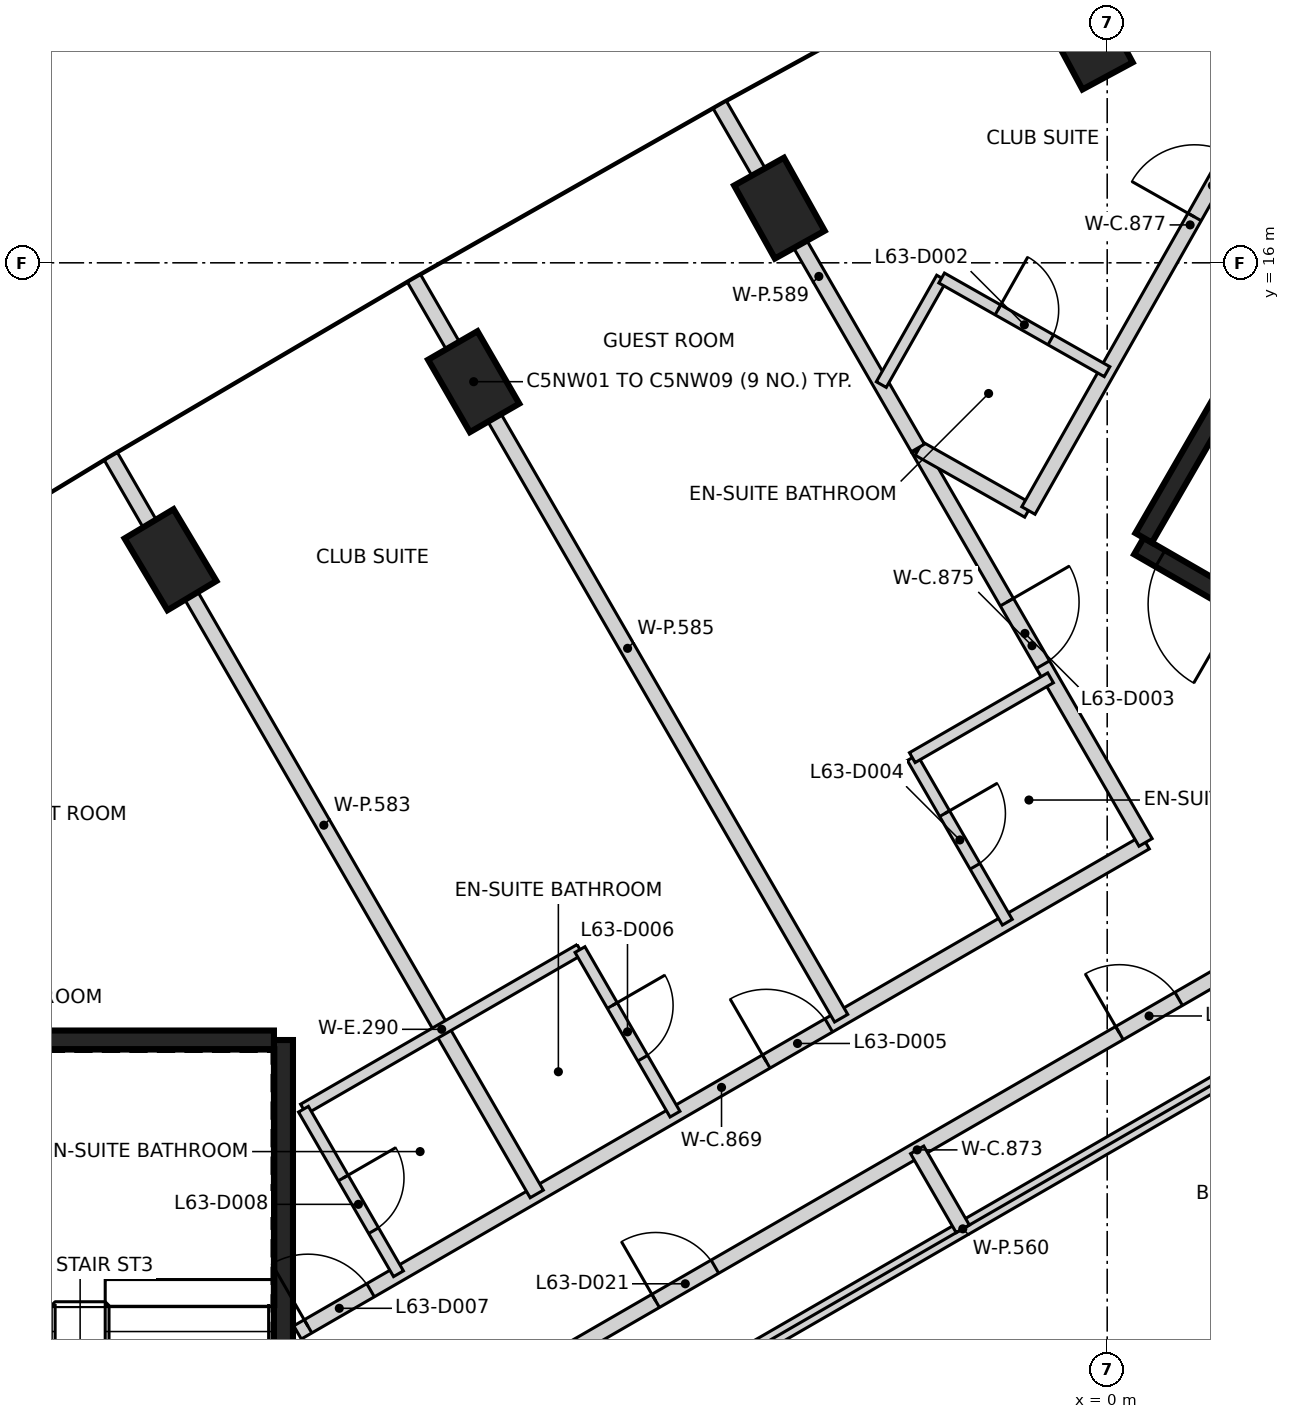
"""IFC4 building model, lengths in metres.
Left out: names, types, materials, properties, quantities, classifications, styles, units other than length and angle.
Written with IfcOpenShell. Run it as: python <this file> out.ifc"""

import sys

from ifc_helpers import new_model, si_unit, direction, frame, frame_2d, origin, origin_2d, place, context, subcontext, project, spatial, rectangle, extrude, element, fill, save


model = new_model("IFC4")
c1 = context("Model", 3, precision=1e-05, world=origin(), true_north=direction((0.0, 1.0)))
c2 = subcontext(c1, "Body", "Model", "MODEL_VIEW")
j1 = project(units=[si_unit("LENGTHUNIT", "METRE"), si_unit("PLANEANGLEUNIT", "RADIAN")], contexts=[c1])
p1 = place(None, origin())
s1 = spatial("IfcSite", under=j1, at=p1, CompositionType="ELEMENT")
p2 = place(p1, origin())
s2 = spatial("IfcBuilding", under=s1, at=p2, CompositionType="ELEMENT")
p3 = place(p2, frame((0.0, 0.0, 250.2)))
s3 = spatial("IfcBuildingStorey", under=s2, at=p3, CompositionType="ELEMENT", Elevation=250.2)
for number, where, z_axis, x_axis in (
    (1, (-0.256, 18.943, -0.35), (0.0, 0.0, 1.0), (-0.475, 0.88, 0.0)),
    (2, (-4.312, 16.719, -0.35), (0.0, 0.0, 1.0), (-0.487, 0.873, 0.0)),
    (3, (-8.335, 14.436, -0.35), (0.0, 0.0, 1.0), (-0.5, 0.866, 0.0)),
    (4, (-12.323, 12.094, -0.35), (0.0, 0.0, 1.0), (-0.513, 0.858, 0.0)),
):
    element("IfcColumn", number, at=place(p3, frame(where, z_axis=z_axis, x_axis=x_axis)), inside=s3, PredefinedType="COLUMN", context=c2, shape_type="SweptSolid", body=[
        extrude(rectangle(XDim=1.1, YDim=0.75, at=origin_2d()), origin(), (0.0, 0.0, 1.0), 3.6),
    ])
p4 = place(p3, frame((-10.837, 5.775, 0.0), z_axis=(0.0, 0.0, 1.0), x_axis=(0.0, -1.0, 0.0)))
e5 = element("IfcWall", 5, at=p4, inside=s3, PredefinedType="SHEAR", context=c2, shape_type="SweptSolid", body=[
    extrude(rectangle(XDim=11.55, YDim=0.25, at=frame_2d((5.775, 0.0))), origin(), (0.0, 0.0, 1.0), 3.25),
])
p5 = place(p4, frame((10.025, 0.0, 0.0)))
e6 = element("IfcOpeningElement", 6, at=p5, cuts=e5, PredefinedType="OPENING", context=c2, shape_type="SweptSolid", body=[
    extrude(rectangle(XDim=1.2, YDim=2.1, at=frame_2d((0.6, 1.05))), frame((0.0, 0.135, 0.0), z_axis=(0.0, -1.0, 0.0), x_axis=(1.0, 0.0, 0.0)), (0.0, 0.0, 1.0), 0.27),
])
p6 = place(p4, frame((8.725, 0.0, 0.0)))
e7 = element("IfcOpeningElement", 7, at=p6, cuts=e5, PredefinedType="OPENING", context=c2, shape_type="SweptSolid", body=[
    extrude(rectangle(XDim=1.2, YDim=2.1, at=frame_2d((0.6, 1.05))), frame((0.0, 0.135, 0.0), z_axis=(0.0, -1.0, 0.0), x_axis=(1.0, 0.0, 0.0)), (0.0, 0.0, 1.0), 0.27),
])
p7 = place(p3, frame((-16.472, 5.775, 0.0), z_axis=(0.0, 0.0, 1.0), x_axis=(1.0, 0.0, 0.0)))
e8 = element("IfcWall", 8, at=p7, inside=s3, PredefinedType="SHEAR", context=c2, shape_type="SweptSolid", body=[
    extrude(rectangle(XDim=5.51, YDim=0.25, at=frame_2d((2.755, 0.0))), origin(), (0.0, 0.0, 1.0), 3.25),
])
p8 = place(p3, frame((10.42, 6.498, 0.0), z_axis=(0.0, 0.0, 1.0), x_axis=(-0.866021906294, 0.500006057782, 0.0)))
e9 = element("IfcWall", 9, at=p8, inside=s3, PredefinedType="SHEAR", context=c2, shape_type="SweptSolid", body=[
    extrude(rectangle(XDim=11.55, YDim=0.25, at=frame_2d((5.775, 0.0))), origin(), (0.0, 0.0, 1.0), 3.25),
])
p9 = place(p8, frame((10.025, 0.0, 0.0)))
e10 = element("IfcOpeningElement", 10, at=p9, cuts=e9, PredefinedType="OPENING", context=c2, shape_type="SweptSolid", body=[
    extrude(rectangle(XDim=1.2, YDim=2.1, at=frame_2d((0.6, 1.05))), frame((0.0, 0.135, 0.0), z_axis=(0.0, -1.0, 0.0), x_axis=(1.0, 0.0, 0.0)), (0.0, 0.0, 1.0), 0.27),
])
p10 = place(p8, frame((8.725, 0.0, 0.0)))
e11 = element("IfcOpeningElement", 11, at=p10, cuts=e9, PredefinedType="OPENING", context=c2, shape_type="SweptSolid", body=[
    extrude(rectangle(XDim=1.2, YDim=2.1, at=frame_2d((0.6, 1.05))), frame((0.0, 0.135, 0.0), z_axis=(0.0, -1.0, 0.0), x_axis=(1.0, 0.0, 0.0)), (0.0, 0.0, 1.0), 0.27),
])
p11 = place(p3, frame((0.48, 12.381, 0.0), z_axis=(0.0, 0.0, 1.0), x_axis=(0.49999885962, 0.866026062182, 0.0)))
e12 = element("IfcWall", 12, at=p11, inside=s3, PredefinedType="SHEAR", context=c2, shape_type="SweptSolid", body=[
    extrude(rectangle(XDim=5.225, YDim=0.25, at=frame_2d((2.612, 0.0))), origin(), (0.0, 0.0, 1.0), 3.25),
])
p12 = place(p3, frame((-10.652, 1.928, 0.0), z_axis=(0.0, 0.0, 1.0), x_axis=(0.865793573301, 0.500401327367, 0.0)))
e13 = element("IfcWall", 13, at=p12, inside=s3, PredefinedType="PARTITIONING", context=c2, shape_type="SweptSolid", body=[
    extrude(rectangle(XDim=12.886, YDim=0.2, at=frame_2d((6.443, 0.0))), origin(), (0.0, 0.0, 1.0), 3.25),
])
p13 = place(p12, frame((7.123, 0.0, 0.0)))
e14 = element("IfcOpeningElement", 14, at=p13, cuts=e13, PredefinedType="OPENING", context=c2, shape_type="SweptSolid", body=[
    extrude(rectangle(XDim=0.95, YDim=2.1, at=frame_2d((0.475, 1.05))), frame((0.0, 0.11, 0.0), z_axis=(0.0, -1.0, 0.0), x_axis=(1.0, 0.0, 0.0)), (0.0, 0.0, 1.0), 0.22),
])
p14 = place(p12, frame((0.16, 0.0, 0.0)))
e15 = element("IfcOpeningElement", 15, at=p14, cuts=e13, PredefinedType="OPENING", context=c2, shape_type="SweptSolid", body=[
    extrude(rectangle(XDim=0.95, YDim=2.1, at=frame_2d((0.475, 1.05))), frame((0.0, 0.11, 0.0), z_axis=(0.0, -1.0, 0.0), x_axis=(1.0, 0.0, 0.0)), (0.0, 0.0, 1.0), 0.22),
])
p15 = place(p3, frame((-8.612, 0.801, 0.0), z_axis=(0.0, 0.0, 1.0), x_axis=(0.866005560651, 0.500034367741, 0.0)))
e16 = element("IfcWall", 16, at=p15, inside=s3, PredefinedType="PARTITIONING", context=c2, shape_type="SweptSolid", body=[
    extrude(rectangle(XDim=14.115, YDim=0.2, at=frame_2d((7.058, 0.0))), origin(), (0.0, 0.0, 1.0), 3.25),
])
p16 = place(p15, frame((10.131, 0.0, 0.0)))
e17 = element("IfcOpeningElement", 17, at=p16, cuts=e16, PredefinedType="OPENING", context=c2, shape_type="SweptSolid", body=[
    extrude(rectangle(XDim=0.9, YDim=2.1, at=frame_2d((0.45, 1.05))), frame((0.0, 0.11, 0.0), z_axis=(0.0, -1.0, 0.0), x_axis=(1.0, 0.0, 0.0)), (0.0, 0.0, 1.0), 0.22),
])
p17 = place(p15, frame((3.085, 0.0, 0.0)))
e18 = element("IfcOpeningElement", 18, at=p17, cuts=e16, PredefinedType="OPENING", context=c2, shape_type="SweptSolid", body=[
    extrude(rectangle(XDim=0.9, YDim=2.1, at=frame_2d((0.45, 1.05))), frame((0.0, 0.11, 0.0), z_axis=(0.0, -1.0, 0.0), x_axis=(1.0, 0.0, 0.0)), (0.0, 0.0, 1.0), 0.22),
])
p18 = place(p3, frame((-2.483, 13.551, 0.0), z_axis=(0.0, 0.0, 1.0), x_axis=(0.499878046143, -0.866095802429, 0.0)))
e19 = element("IfcWall", 19, at=p18, inside=s3, PredefinedType="PARTITIONING", context=c2, shape_type="SweptSolid", body=[
    extrude(rectangle(XDim=5.977, YDim=0.2, at=frame_2d((2.988, 0.0))), origin(), (0.0, 0.0, 1.0), 3.25),
])
p19 = place(p18, frame((2.327, 0.0, 0.0)))
e20 = element("IfcOpeningElement", 20, at=p19, cuts=e19, PredefinedType="OPENING", context=c2, shape_type="SweptSolid", body=[
    extrude(rectangle(XDim=0.95, YDim=2.1, at=frame_2d((0.475, 1.05))), frame((0.0, 0.11, 0.0), z_axis=(0.0, -1.0, 0.0), x_axis=(1.0, 0.0, 0.0)), (0.0, 0.0, 1.0), 0.22),
])
p20 = place(p3, frame((-2.478, 13.556, 0.0), z_axis=(0.0, 0.0, 1.0), x_axis=(0.870609500021, -0.491974692919, 0.0)))
e21 = element("IfcWall", 21, at=p20, inside=s3, PredefinedType="PARTITIONING", context=c2, shape_type="SweptSolid", body=[
    extrude(rectangle(XDim=1.656, YDim=0.2, at=frame_2d((0.828, 0.0))), origin(), (0.0, 0.0, 1.0), 3.25),
])
p21 = place(p3, frame((-1.037, 12.741, 0.0), z_axis=(0.0, 0.0, 1.0), x_axis=(0.492679417867, 0.870210888929, 0.0)))
e22 = element("IfcWall", 22, at=p21, inside=s3, PredefinedType="PARTITIONING", context=c2, shape_type="SweptSolid", body=[
    extrude(rectangle(XDim=8.636, YDim=0.2, at=frame_2d((4.318, 0.0))), origin(), (0.0, 0.0, 1.0), 3.25),
])
p22 = place(p21, frame((4.438, 0.0, 0.0)))
e23 = element("IfcOpeningElement", 23, at=p22, cuts=e22, PredefinedType="OPENING", context=c2, shape_type="SweptSolid", body=[
    extrude(rectangle(XDim=0.95, YDim=2.1, at=frame_2d((0.475, 1.05))), frame((0.0, 0.11, 0.0), z_axis=(0.0, -1.0, 0.0), x_axis=(1.0, 0.0, 0.0)), (0.0, 0.0, 1.0), 0.22),
])
p23 = place(p3, frame((-13.107, 13.453, 0.0), z_axis=(0.0, 0.0, 1.0), x_axis=(0.50003870279, -0.866003057565, 0.0)))
e24 = element("IfcWall", 24, at=p23, inside=s3, PredefinedType="PARTITIONING", context=c2, shape_type="SweptSolid", body=[
    extrude(rectangle(XDim=11.204, YDim=0.2, at=frame_2d((5.602, 0.0))), origin(), (0.0, 0.0, 1.0), 3.25),
])
p24 = place(p3, frame((-9.119, 15.795, 0.0), z_axis=(0.0, 0.0, 1.0), x_axis=(0.500015176972, -0.866016641178, 0.0)))
e25 = element("IfcWall", 25, at=p24, inside=s3, PredefinedType="PARTITIONING", context=c2, shape_type="SweptSolid", body=[
    extrude(rectangle(XDim=11.239, YDim=0.2, at=frame_2d((5.619, 0.0))), origin(), (0.0, 0.0, 1.0), 3.25),
])
p25 = place(p3, frame((-6.0, 0.924, 0.0), z_axis=(0.0, 0.0, 1.0), x_axis=(0.866012967051, 0.500021540435, 0.0)))
e26 = element("IfcWall", 26, at=p25, inside=s3, PredefinedType="PARTITIONING", context=c2, shape_type="SweptSolid", body=[
    extrude(rectangle(XDim=9.468, YDim=0.2, at=frame_2d((4.734, 0.0))), origin(), (0.0, 0.0, 1.0), 3.25),
])
p26 = place(p3, frame((-5.097, 18.078, 0.0), z_axis=(0.0, 0.0, 1.0), x_axis=(0.499977898262, -0.866038163853, 0.0)))
e27 = element("IfcWall", 27, at=p26, inside=s3, PredefinedType="PARTITIONING", context=c2, shape_type="SweptSolid", body=[
    extrude(rectangle(XDim=5.212, YDim=0.2, at=frame_2d((2.606, 0.0))), origin(), (0.0, 0.0, 1.0), 3.25),
])
p27 = place(p3, frame((-2.5, 4.33, 0.0), z_axis=(0.0, 0.0, 1.0), x_axis=(0.499969057507, -0.866043267704, 0.0)))
e28 = element("IfcWall", 28, at=p27, inside=s3, PredefinedType="PARTITIONING", context=c2, shape_type="SweptSolid", body=[
    extrude(rectangle(XDim=1.2, YDim=0.2, at=frame_2d((0.6, 0.0))), origin(), (0.0, 0.0, 1.0), 3.25),
])
p28 = place(p3, frame((-10.574, 4.866, 0.0), z_axis=(0.0, 0.0, 1.0), x_axis=(0.866052994476, 0.499952208475, 0.0)))
e29 = element("IfcWall", 29, at=p28, inside=s3, PredefinedType="PARTITIONING", context=c2, shape_type="SweptSolid", body=[
    extrude(rectangle(XDim=4.201, YDim=0.15, at=frame_2d((2.1, 0.0))), origin(), (0.0, 0.0, 1.0), 3.25),
])
p29 = place(p3, frame((-10.574, 4.865, 0.0), z_axis=(0.0, 0.0, 1.0), x_axis=(0.500004234368, -0.866022959057, 0.0)))
e30 = element("IfcWall", 30, at=p29, inside=s3, PredefinedType="PARTITIONING", context=c2, shape_type="SweptSolid", body=[
    extrude(rectangle(XDim=2.5, YDim=0.15, at=frame_2d((1.25, 0.0))), origin(), (0.0, 0.0, 1.0), 3.25),
])
p30 = place(p29, frame((1.045, 0.0, 0.0)))
e31 = element("IfcOpeningElement", 31, at=p30, cuts=e30, PredefinedType="OPENING", context=c2, shape_type="SweptSolid", body=[
    extrude(rectangle(XDim=0.8, YDim=2.1, at=frame_2d((0.4, 1.05))), frame((0.0, 0.085, 0.0), z_axis=(0.0, -1.0, 0.0), x_axis=(1.0, 0.0, 0.0)), (0.0, 0.0, 1.0), 0.17),
])
p31 = place(p3, frame((-6.936, 6.965, 0.0), z_axis=(0.0, 0.0, 1.0), x_axis=(0.500004234368, -0.866022959057, 0.0)))
e32 = element("IfcWall", 32, at=p31, inside=s3, PredefinedType="PARTITIONING", context=c2, shape_type="SweptSolid", body=[
    extrude(rectangle(XDim=2.5, YDim=0.15, at=frame_2d((1.25, 0.0))), origin(), (0.0, 0.0, 1.0), 3.25),
])
p32 = place(p31, frame((0.85, 0.0, 0.0)))
e33 = element("IfcOpeningElement", 33, at=p32, cuts=e32, PredefinedType="OPENING", context=c2, shape_type="SweptSolid", body=[
    extrude(rectangle(XDim=0.8, YDim=2.1, at=frame_2d((0.4, 1.05))), frame((0.0, 0.085, 0.0), z_axis=(0.0, -1.0, 0.0), x_axis=(1.0, 0.0, 0.0)), (0.0, 0.0, 1.0), 0.17),
])
p33 = place(p3, frame((-2.972, 14.398, 0.0), z_axis=(0.0, 0.0, 1.0), x_axis=(0.492741112884, 0.870175956732, 0.0)))
e34 = element("IfcWall", 34, at=p33, inside=s3, PredefinedType="PARTITIONING", context=c2, shape_type="SweptSolid", body=[
    extrude(rectangle(XDim=1.611, YDim=0.15, at=frame_2d((0.806, 0.0))), origin(), (0.0, 0.0, 1.0), 3.25),
])
p34 = place(p3, frame((-2.564, 9.49, 0.0), z_axis=(0.0, 0.0, 1.0), x_axis=(0.500004234368, -0.866022959057, 0.0)))
e35 = element("IfcWall", 35, at=p34, inside=s3, PredefinedType="PARTITIONING", context=c2, shape_type="SweptSolid", body=[
    extrude(rectangle(XDim=2.5, YDim=0.15, at=frame_2d((1.25, 0.0))), origin(), (0.0, 0.0, 1.0), 3.25),
])
p35 = place(p34, frame((0.85, 0.0, 0.0)))
e36 = element("IfcOpeningElement", 36, at=p35, cuts=e35, PredefinedType="OPENING", context=c2, shape_type="SweptSolid", body=[
    extrude(rectangle(XDim=0.8, YDim=2.1, at=frame_2d((0.4, 1.05))), frame((0.0, 0.085, 0.0), z_axis=(0.0, -1.0, 0.0), x_axis=(1.0, 0.0, 0.0)), (0.0, 0.0, 1.0), 0.17),
])
p36 = place(p3, frame((-2.564, 9.49, 0.0), z_axis=(0.0, 0.0, 1.0), x_axis=(0.866038466041, 0.499977374825, 0.0)))
e37 = element("IfcWall", 37, at=p36, inside=s3, PredefinedType="PARTITIONING", context=c2, shape_type="SweptSolid", body=[
    extrude(rectangle(XDim=2.1, YDim=0.15, at=frame_2d((1.05, 0.0))), origin(), (0.0, 0.0, 1.0), 3.25),
])
p37 = place(p3, frame((-2.178, 15.8, 0.0), z_axis=(0.0, 0.0, 1.0), x_axis=(0.870218946292, -0.492665186019, 0.0)))
e38 = element("IfcWall", 38, at=p37, inside=s3, PredefinedType="PARTITIONING", context=c2, shape_type="SweptSolid", body=[
    extrude(rectangle(XDim=2.5, YDim=0.15, at=frame_2d((1.25, 0.0))), origin(), (0.0, 0.0, 1.0), 3.25),
])
p38 = place(p37, frame((0.85, 0.0, 0.0)))
e39 = element("IfcOpeningElement", 39, at=p38, cuts=e38, PredefinedType="OPENING", context=c2, shape_type="SweptSolid", body=[
    extrude(rectangle(XDim=0.8, YDim=2.1, at=frame_2d((0.4, 1.05))), frame((0.0, 0.085, 0.0), z_axis=(0.0, -1.0, 0.0), x_axis=(1.0, 0.0, 0.0)), (0.0, 0.0, 1.0), 0.17),
])
p39 = place(p9, origin())
e40 = element("IfcDoor", 40, at=p39, inside=s3, OperationType="SINGLE_SWING_LEFT", PredefinedType="DOOR", context=c2, shape_type="SweptSolid", body=[
    extrude(rectangle(XDim=1.2, YDim=2.1, at=frame_2d((0.6, 1.05))), frame((0.0, 0.025, 0.0), z_axis=(0.0, -1.0, 0.0), x_axis=(1.0, 0.0, 0.0)), (0.0, 0.0, 1.0), 0.05),
])
fill(e10, e40)
p40 = place(p22, origin())
e41 = element("IfcDoor", 41, at=p40, inside=s3, OperationType="SINGLE_SWING_LEFT", PredefinedType="DOOR", context=c2, shape_type="SweptSolid", body=[
    extrude(rectangle(XDim=0.95, YDim=2.1, at=frame_2d((0.475, 1.05))), frame((0.0, 0.025, 0.0), z_axis=(0.0, -1.0, 0.0), x_axis=(1.0, 0.0, 0.0)), (0.0, 0.0, 1.0), 0.05),
])
fill(e23, e41)
p41 = place(p38, origin())
e42 = element("IfcDoor", 42, at=p41, inside=s3, OperationType="SINGLE_SWING_LEFT", PredefinedType="DOOR", context=c2, shape_type="SweptSolid", body=[
    extrude(rectangle(XDim=0.8, YDim=2.1, at=frame_2d((0.4, 1.05))), frame((0.0, 0.025, 0.0), z_axis=(0.0, -1.0, 0.0), x_axis=(1.0, 0.0, 0.0)), (0.0, 0.0, 1.0), 0.05),
])
fill(e39, e42)
p42 = place(p19, frame((0.95, 0.0, 0.0), z_axis=(0.0, 0.0, 1.0), x_axis=(-1.0, 0.0, 0.0)))
e43 = element("IfcDoor", 43, at=p42, inside=s3, OperationType="SINGLE_SWING_LEFT", PredefinedType="DOOR", context=c2, shape_type="SweptSolid", body=[
    extrude(rectangle(XDim=0.95, YDim=2.1, at=frame_2d((0.475, 1.05))), frame((0.0, 0.025, 0.0), z_axis=(0.0, -1.0, 0.0), x_axis=(1.0, 0.0, 0.0)), (0.0, 0.0, 1.0), 0.05),
])
fill(e20, e43)
p43 = place(p35, frame((0.8, 0.0, 0.0), z_axis=(0.0, 0.0, 1.0), x_axis=(-1.0, 0.0, 0.0)))
e44 = element("IfcDoor", 44, at=p43, inside=s3, OperationType="SINGLE_SWING_LEFT", PredefinedType="DOOR", context=c2, shape_type="SweptSolid", body=[
    extrude(rectangle(XDim=0.8, YDim=2.1, at=frame_2d((0.4, 1.05))), frame((0.0, 0.025, 0.0), z_axis=(0.0, -1.0, 0.0), x_axis=(1.0, 0.0, 0.0)), (0.0, 0.0, 1.0), 0.05),
])
fill(e36, e44)
p44 = place(p13, origin())
e45 = element("IfcDoor", 45, at=p44, inside=s3, OperationType="SINGLE_SWING_LEFT", PredefinedType="DOOR", context=c2, shape_type="SweptSolid", body=[
    extrude(rectangle(XDim=0.95, YDim=2.1, at=frame_2d((0.475, 1.05))), frame((0.0, 0.025, 0.0), z_axis=(0.0, -1.0, 0.0), x_axis=(1.0, 0.0, 0.0)), (0.0, 0.0, 1.0), 0.05),
])
fill(e14, e45)
p45 = place(p32, origin())
e46 = element("IfcDoor", 46, at=p45, inside=s3, OperationType="SINGLE_SWING_LEFT", PredefinedType="DOOR", context=c2, shape_type="SweptSolid", body=[
    extrude(rectangle(XDim=0.8, YDim=2.1, at=frame_2d((0.4, 1.05))), frame((0.0, 0.025, 0.0), z_axis=(0.0, -1.0, 0.0), x_axis=(1.0, 0.0, 0.0)), (0.0, 0.0, 1.0), 0.05),
])
fill(e33, e46)
p46 = place(p14, origin())
e47 = element("IfcDoor", 47, at=p46, inside=s3, OperationType="SINGLE_SWING_LEFT", PredefinedType="DOOR", context=c2, shape_type="SweptSolid", body=[
    extrude(rectangle(XDim=0.95, YDim=2.1, at=frame_2d((0.475, 1.05))), frame((0.0, 0.025, 0.0), z_axis=(0.0, -1.0, 0.0), x_axis=(1.0, 0.0, 0.0)), (0.0, 0.0, 1.0), 0.05),
])
fill(e15, e47)
p47 = place(p30, frame((0.8, 0.0, 0.0), z_axis=(0.0, 0.0, 1.0), x_axis=(-1.0, 0.0, 0.0)))
e48 = element("IfcDoor", 48, at=p47, inside=s3, OperationType="SINGLE_SWING_LEFT", PredefinedType="DOOR", context=c2, shape_type="SweptSolid", body=[
    extrude(rectangle(XDim=0.8, YDim=2.1, at=frame_2d((0.4, 1.05))), frame((0.0, 0.025, 0.0), z_axis=(0.0, -1.0, 0.0), x_axis=(1.0, 0.0, 0.0)), (0.0, 0.0, 1.0), 0.05),
])
fill(e31, e48)
p48 = place(p16, frame((0.9, 0.0, 0.0), z_axis=(0.0, 0.0, 1.0), x_axis=(-1.0, 0.0, 0.0)))
e49 = element("IfcDoor", 49, at=p48, inside=s3, OperationType="SINGLE_SWING_LEFT", PredefinedType="DOOR", context=c2, shape_type="SweptSolid", body=[
    extrude(rectangle(XDim=0.9, YDim=2.1, at=frame_2d((0.45, 1.05))), frame((0.0, 0.025, 0.0), z_axis=(0.0, -1.0, 0.0), x_axis=(1.0, 0.0, 0.0)), (0.0, 0.0, 1.0), 0.05),
])
fill(e17, e49)
p49 = place(p17, frame((0.9, 0.0, 0.0), z_axis=(0.0, 0.0, 1.0), x_axis=(-1.0, 0.0, 0.0)))
e50 = element("IfcDoor", 50, at=p49, inside=s3, OperationType="SINGLE_SWING_LEFT", PredefinedType="DOOR", context=c2, shape_type="SweptSolid", body=[
    extrude(rectangle(XDim=0.9, YDim=2.1, at=frame_2d((0.45, 1.05))), frame((0.0, 0.025, 0.0), z_axis=(0.0, -1.0, 0.0), x_axis=(1.0, 0.0, 0.0)), (0.0, 0.0, 1.0), 0.05),
])
fill(e18, e50)
save(model, sys.argv[1])
